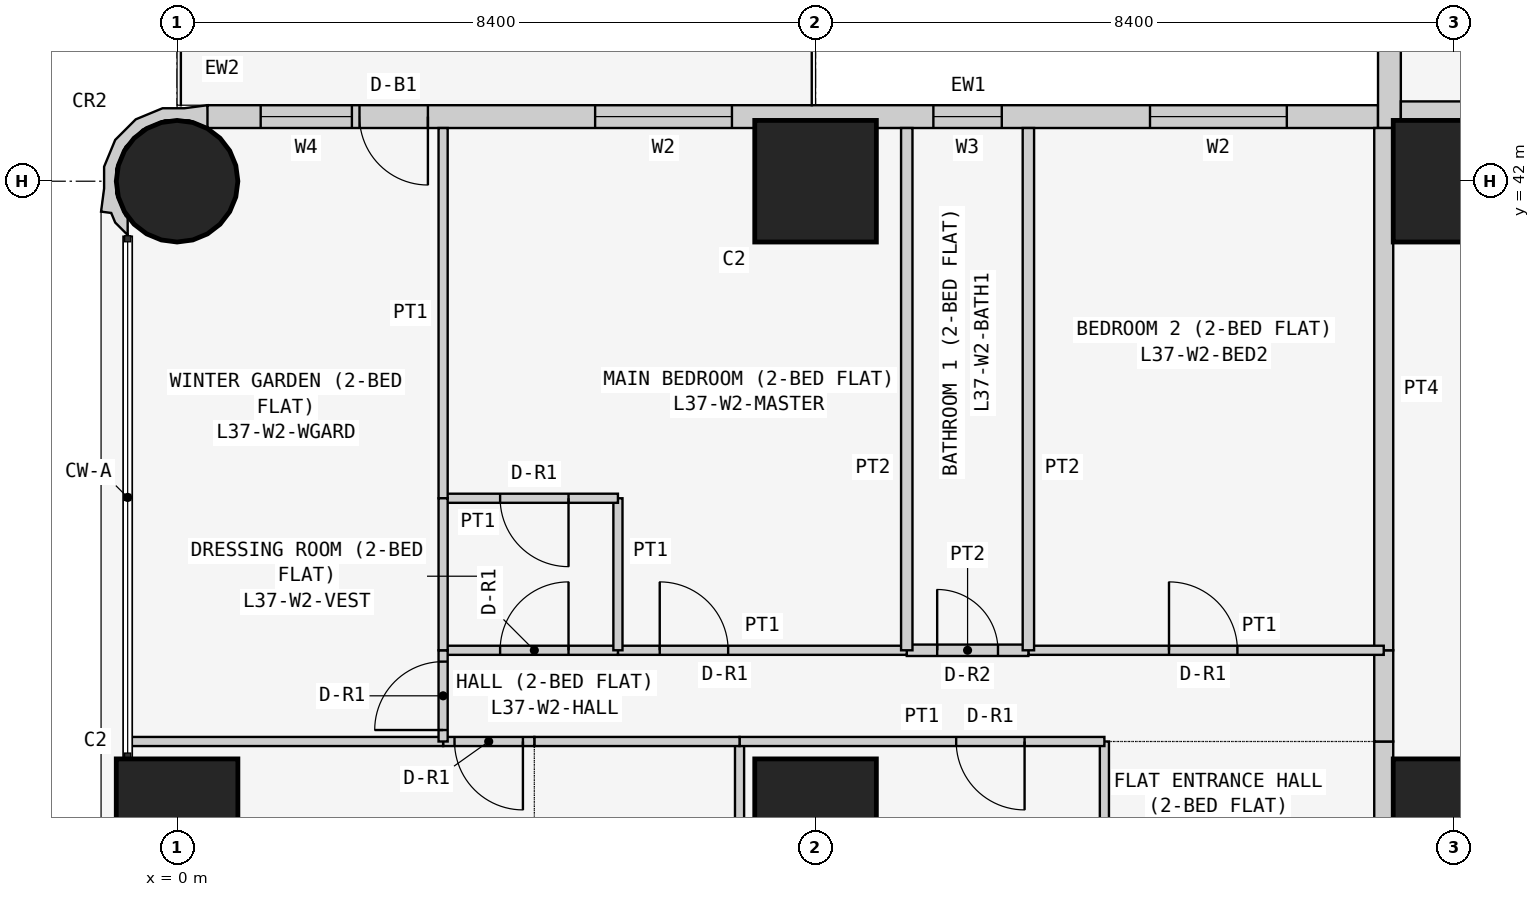
"""IFC4 building model, lengths in metres.
Left out: names, types, materials, properties, quantities, classifications, styles, units other than length and angle.
Written with IfcOpenShell. Run it as: python <this file> out.ifc"""

import sys

from ifc_helpers import new_model, si_unit, direction, frame, frame_2d, origin, origin_2d, place, context, subcontext, project, spatial, polyline, rectangle, circle, outline, extrude, element, fill, save


model = new_model("IFC4")
c1 = context("Model", 3, precision=1e-05, world=origin(), true_north=direction((0.0, 1.0)))
c2 = subcontext(c1, "Body", "Model", "MODEL_VIEW")
j1 = project(units=[si_unit("LENGTHUNIT", "METRE"), si_unit("PLANEANGLEUNIT", "RADIAN")], contexts=[c1])
p1 = place(None, origin())
s1 = spatial("IfcSite", under=j1, at=p1, CompositionType="ELEMENT")
p2 = place(p1, origin())
s2 = spatial("IfcBuilding", under=s1, at=p2, CompositionType="ELEMENT")
p3 = place(p2, frame((0.0, 0.0, 144.9)))
s3 = spatial("IfcBuildingStorey", under=s2, at=p3, CompositionType="ELEMENT", Elevation=144.9)
p4 = place(p3, frame((0.0, 33.6, 0.0), z_axis=(0.0, 0.0, 1.0), x_axis=(1.0, 0.0, 0.0)))
e1 = element("IfcColumn", 1, at=p4, inside=s3, PredefinedType="COLUMN", context=c2, shape_type="SweptSolid", body=[
    extrude(rectangle(XDim=1.6, YDim=1.6, at=origin_2d()), origin(), (0.0, 0.0, 1.0), 3.6),
])
p5 = place(p3, frame((0.0, 42.0, 0.0), z_axis=(0.0, 0.0, 1.0), x_axis=(1.0, 0.0, 0.0)))
e2 = element("IfcColumn", 2, at=p5, inside=s3, PredefinedType="COLUMN", context=c2, shape_type="SweptSolid", body=[
    extrude(circle(Radius=0.8, at=origin_2d()), origin(), (0.0, 0.0, 1.0), 3.6),
])
for number, where, z_axis, x_axis in (
    (3, (8.4, 33.6, 0.0), (0.0, 0.0, 1.0), (1.0, 0.0, 0.0)),
    (4, (8.4, 42.0, 0.0), (0.0, 0.0, 1.0), (1.0, 0.0, 0.0)),
    (5, (16.8, 33.6, 0.0), (0.0, 0.0, 1.0), (1.0, 0.0, 0.0)),
    (6, (16.8, 42.0, 0.0), (0.0, 0.0, 1.0), (1.0, 0.0, 0.0)),
):
    element("IfcColumn", number, at=place(p3, frame(where, z_axis=z_axis, x_axis=x_axis)), inside=s3, PredefinedType="COLUMN", context=c2, shape_type="SweptSolid", body=[
        extrude(rectangle(XDim=1.6, YDim=1.6, at=origin_2d()), origin(), (0.0, 0.0, 1.0), 3.6),
    ])
p6 = place(p3, frame((15.8, 42.85, 0.0), z_axis=(0.0, 0.0, 1.0), x_axis=(-1.0, 0.0, 0.0)))
e7 = element("IfcWall", 7, at=p6, inside=s3, PredefinedType="SOLIDWALL", context=c2, shape_type="SweptSolid", body=[
    extrude(rectangle(XDim=15.4, YDim=0.3, at=frame_2d((7.7, 0.0))), origin(), (0.0, 0.0, 1.0), 3.45),
])
p7 = place(p6, frame((1.2, 0.0, 0.9)))
e8 = element("IfcOpeningElement", 8, at=p7, cuts=e7, PredefinedType="OPENING", context=c2, shape_type="SweptSolid", body=[
    extrude(rectangle(XDim=1.8, YDim=1.5, at=frame_2d((0.9, 0.75))), frame((0.0, 0.16, 0.0), z_axis=(0.0, -1.0, 0.0), x_axis=(1.0, 0.0, 0.0)), (0.0, 0.0, 1.0), 0.32),
])
p8 = place(p6, frame((4.95, 0.0, 1.5)))
e9 = element("IfcOpeningElement", 9, at=p8, cuts=e7, PredefinedType="OPENING", context=c2, shape_type="SweptSolid", body=[
    extrude(rectangle(XDim=0.9, YDim=0.7, at=frame_2d((0.45, 0.35))), frame((0.0, 0.16, 0.0), z_axis=(0.0, -1.0, 0.0), x_axis=(1.0, 0.0, 0.0)), (0.0, 0.0, 1.0), 0.32),
])
p9 = place(p6, frame((8.5, 0.0, 0.9)))
e10 = element("IfcOpeningElement", 10, at=p9, cuts=e7, PredefinedType="OPENING", context=c2, shape_type="SweptSolid", body=[
    extrude(rectangle(XDim=1.8, YDim=1.5, at=frame_2d((0.9, 0.75))), frame((0.0, 0.16, 0.0), z_axis=(0.0, -1.0, 0.0), x_axis=(1.0, 0.0, 0.0)), (0.0, 0.0, 1.0), 0.32),
])
p10 = place(p6, frame((12.5, 0.0, 0.0)))
e11 = element("IfcOpeningElement", 11, at=p10, cuts=e7, PredefinedType="OPENING", context=c2, shape_type="SweptSolid", body=[
    extrude(rectangle(XDim=0.9, YDim=2.4, at=frame_2d((0.45, 1.2))), frame((0.0, 0.16, 0.0), z_axis=(0.0, -1.0, 0.0), x_axis=(1.0, 0.0, 0.0)), (0.0, 0.0, 1.0), 0.32),
])
p11 = place(p6, frame((13.5, 0.0, 0.9)))
e12 = element("IfcOpeningElement", 12, at=p11, cuts=e7, PredefinedType="OPENING", context=c2, shape_type="SweptSolid", body=[
    extrude(rectangle(XDim=1.2, YDim=1.5, at=frame_2d((0.6, 0.75))), frame((0.0, 0.16, 0.0), z_axis=(0.0, -1.0, 0.0), x_axis=(1.0, 0.0, 0.0)), (0.0, 0.0, 1.0), 0.32),
])
p12 = place(p3, frame((15.95, 50.0, 0.0), z_axis=(0.0, 0.0, 1.0), x_axis=(0.0, -1.0, 0.0)))
e13 = element("IfcWall", 13, at=p12, inside=s3, PredefinedType="SOLIDWALL", context=c2, shape_type="SweptSolid", body=[
    extrude(rectangle(XDim=7.3, YDim=0.3, at=frame_2d((3.65, 0.0))), origin(), (0.0, 0.0, 1.0), 3.45),
])
p13 = place(p12, frame((3.1, 0.0, 0.9)))
e14 = element("IfcOpeningElement", 14, at=p13, cuts=e13, PredefinedType="OPENING", context=c2, shape_type="SweptSolid", body=[
    extrude(rectangle(XDim=2.4, YDim=1.5, at=frame_2d((1.2, 0.75))), frame((0.0, 0.16, 0.0), z_axis=(0.0, -1.0, 0.0), x_axis=(1.0, 0.0, 0.0)), (0.0, 0.0, 1.0), 0.32),
])
p14 = place(p12, frame((0.75, 0.0, 0.9)))
e15 = element("IfcOpeningElement", 15, at=p14, cuts=e13, PredefinedType="OPENING", context=c2, shape_type="SweptSolid", body=[
    extrude(rectangle(XDim=1.2, YDim=1.5, at=frame_2d((0.6, 0.75))), frame((0.0, 0.16, 0.0), z_axis=(0.0, -1.0, 0.0), x_axis=(1.0, 0.0, 0.0)), (0.0, 0.0, 1.0), 0.32),
])
p15 = place(p3, frame((0.327, 42.817, 0.0), z_axis=(0.0, 0.0, 1.0), x_axis=(-0.93923434088, 0.343276641956, 0.0)))
e16 = element("IfcWall", 16, at=p15, inside=s3, PredefinedType="SOLIDWALL", context=c2, shape_type="SweptSolid", body=[
    extrude(outline(polyline([(-0.006, -0.197), (0.266, -0.055), (0.535, 0.044), (0.816, 0.302), (0.977, 0.648), (0.994, 1.03), (0.895, 1.299), (0.828, 1.598), (0.697, 1.569), (0.604, 1.67), (0.394, 1.767), (0.471, 1.556), (0.509, 1.539), (0.724, 1.304), (0.833, 1.005), (0.82, 0.687), (0.686, 0.397), (0.451, 0.182), (0.152, 0.073), (-0.116, 0.084), (-0.127, 0.078), (-0.146, 0.071), (-0.006, -0.197)])), origin(), (0.0, 0.0, 1.0), 3.45),
])
p16 = place(p3, frame((16.1, 42.925, 0.0), z_axis=(0.0, 0.0, 1.0), x_axis=(1.0, 0.0, 0.0)))
e17 = element("IfcWall", 17, at=p16, inside=s3, PredefinedType="PARTITIONING", context=c2, shape_type="SweptSolid", body=[
    extrude(rectangle(XDim=6.871, YDim=0.25, at=frame_2d((3.436, 0.0))), origin(), (0.0, 0.0, 1.0), 3.45),
])
p17 = place(p3, frame((15.875, 29.4, 0.0), z_axis=(0.0, 0.0, 1.0), x_axis=(0.0, 1.0, 0.0)))
e18 = element("IfcWall", 18, at=p17, inside=s3, PredefinedType="PARTITIONING", context=c2, shape_type="SweptSolid", body=[
    extrude(rectangle(XDim=5.229, YDim=0.25, at=frame_2d((2.615, 0.0))), origin(), (0.0, 0.0, 1.0), 3.45),
])
p18 = place(p17, frame((2.1, 0.0, 0.0)))
e19 = element("IfcOpeningElement", 19, at=p18, cuts=e18, PredefinedType="OPENING", context=c2, shape_type="SweptSolid", body=[
    extrude(rectangle(XDim=1.0, YDim=2.1, at=frame_2d((0.5, 1.05))), frame((0.0, 0.135, 0.0), z_axis=(0.0, -1.0, 0.0), x_axis=(1.0, 0.0, 0.0)), (0.0, 0.0, 1.0), 0.27),
])
p19 = place(p3, frame((15.875, 34.629, 0.0), z_axis=(0.0, 0.0, 1.0), x_axis=(0.0, 1.0, 0.0)))
e20 = element("IfcWall", 20, at=p19, inside=s3, PredefinedType="PARTITIONING", context=c2, shape_type="SweptSolid", body=[
    extrude(rectangle(XDim=1.2, YDim=0.25, at=frame_2d((0.6, 0.0))), origin(), (0.0, 0.0, 1.0), 3.45),
])
p20 = place(p3, frame((15.875, 35.829, 0.0), z_axis=(0.0, 0.0, 1.0), x_axis=(0.0, 1.0, 0.0)))
e21 = element("IfcWall", 21, at=p20, inside=s3, PredefinedType="PARTITIONING", context=c2, shape_type="SweptSolid", body=[
    extrude(rectangle(XDim=6.871, YDim=0.25, at=frame_2d((3.436, 0.0))), origin(), (0.0, 0.0, 1.0), 3.45),
])
for number, where, z_axis, x_axis in (
    (22, (12.2, 29.4, 0.0), (0.0, 0.0, 1.0), (0.0, 1.0, 0.0)),
    (23, (7.4, 29.4, 0.0), (0.0, 0.0, 1.0), (0.0, 1.0, 0.0)),
):
    element("IfcWall", number, at=place(p3, frame(where, z_axis=z_axis, x_axis=x_axis)), inside=s3, PredefinedType="PARTITIONING", context=c2, shape_type="SweptSolid", body=[
        extrude(rectangle(XDim=5.229, YDim=0.12, at=frame_2d((2.615, 0.0))), origin(), (0.0, 0.0, 1.0), 3.45),
    ])
p21 = place(p3, frame((7.4, 34.629, 0.0), z_axis=(0.0, 0.0, 1.0), x_axis=(1.0, 0.0, 0.0)))
e24 = element("IfcWall", 24, at=p21, inside=s3, PredefinedType="PARTITIONING", context=c2, shape_type="SweptSolid", body=[
    extrude(rectangle(XDim=4.8, YDim=0.12, at=frame_2d((2.4, 0.0))), origin(), (0.0, 0.0, 1.0), 3.45),
])
p22 = place(p21, frame((2.85, 0.0, 0.0)))
e25 = element("IfcOpeningElement", 25, at=p22, cuts=e24, PredefinedType="OPENING", context=c2, shape_type="SweptSolid", body=[
    extrude(rectangle(XDim=0.9, YDim=2.1, at=frame_2d((0.45, 1.05))), frame((0.0, 0.07, 0.0), z_axis=(0.0, -1.0, 0.0), x_axis=(1.0, 0.0, 0.0)), (0.0, 0.0, 1.0), 0.14),
])
p23 = place(p3, frame((4.7, 34.629, 0.0), z_axis=(0.0, 0.0, 1.0), x_axis=(1.0, 0.0, 0.0)))
e26 = element("IfcWall", 26, at=p23, inside=s3, PredefinedType="PARTITIONING", context=c2, shape_type="SweptSolid", body=[
    extrude(rectangle(XDim=2.7, YDim=0.12, at=frame_2d((1.35, 0.0))), origin(), (0.0, 0.0, 1.0), 3.45),
])
p24 = place(p3, frame((3.5, 34.629, 0.0), z_axis=(0.0, 0.0, 1.0), x_axis=(1.0, 0.0, 0.0)))
e27 = element("IfcWall", 27, at=p24, inside=s3, PredefinedType="PARTITIONING", context=c2, shape_type="SweptSolid", body=[
    extrude(rectangle(XDim=1.2, YDim=0.12, at=frame_2d((0.6, 0.0))), origin(), (0.0, 0.0, 1.0), 3.45),
])
p25 = place(p24, frame((0.15, 0.0, 0.0)))
e28 = element("IfcOpeningElement", 28, at=p25, cuts=e27, PredefinedType="OPENING", context=c2, shape_type="SweptSolid", body=[
    extrude(rectangle(XDim=0.9, YDim=2.1, at=frame_2d((0.45, 1.05))), frame((0.0, 0.07, 0.0), z_axis=(0.0, -1.0, 0.0), x_axis=(1.0, 0.0, 0.0)), (0.0, 0.0, 1.0), 0.14),
])
p26 = place(p3, frame((-0.65, 34.629, 0.0), z_axis=(0.0, 0.0, 1.0), x_axis=(1.0, 0.0, 0.0)))
e29 = element("IfcWall", 29, at=p26, inside=s3, PredefinedType="PARTITIONING", context=c2, shape_type="SweptSolid", body=[
    extrude(rectangle(XDim=4.15, YDim=0.12, at=frame_2d((2.075, 0.0))), origin(), (0.0, 0.0, 1.0), 3.45),
])
p27 = place(p3, frame((11.2, 35.829, 0.0), z_axis=(0.0, 0.0, 1.0), x_axis=(1.0, 0.0, 0.0)))
e30 = element("IfcWall", 30, at=p27, inside=s3, PredefinedType="PARTITIONING", context=c2, shape_type="SweptSolid", body=[
    extrude(rectangle(XDim=4.675, YDim=0.12, at=frame_2d((2.337, 0.0))), origin(), (0.0, 0.0, 1.0), 3.45),
])
p28 = place(p27, frame((1.85, 0.0, 0.0)))
e31 = element("IfcOpeningElement", 31, at=p28, cuts=e30, PredefinedType="OPENING", context=c2, shape_type="SweptSolid", body=[
    extrude(rectangle(XDim=0.9, YDim=2.1, at=frame_2d((0.45, 1.05))), frame((0.0, 0.07, 0.0), z_axis=(0.0, -1.0, 0.0), x_axis=(1.0, 0.0, 0.0)), (0.0, 0.0, 1.0), 0.14),
])
p29 = place(p3, frame((9.6, 35.829, 0.0), z_axis=(0.0, 0.0, 1.0), x_axis=(1.0, 0.0, 0.0)))
e32 = element("IfcWall", 32, at=p29, inside=s3, PredefinedType="PARTITIONING", context=c2, shape_type="SweptSolid", body=[
    extrude(rectangle(XDim=1.6, YDim=0.15, at=frame_2d((0.8, 0.0))), origin(), (0.0, 0.0, 1.0), 3.45),
])
p30 = place(p29, frame((0.4, 0.0, 0.0)))
e33 = element("IfcOpeningElement", 33, at=p30, cuts=e32, PredefinedType="OPENING", context=c2, shape_type="SweptSolid", body=[
    extrude(rectangle(XDim=0.8, YDim=2.1, at=frame_2d((0.4, 1.05))), frame((0.0, 0.085, 0.0), z_axis=(0.0, -1.0, 0.0), x_axis=(1.0, 0.0, 0.0)), (0.0, 0.0, 1.0), 0.17),
])
p31 = place(p3, frame((5.8, 35.829, 0.0), z_axis=(0.0, 0.0, 1.0), x_axis=(1.0, 0.0, 0.0)))
e34 = element("IfcWall", 34, at=p31, inside=s3, PredefinedType="PARTITIONING", context=c2, shape_type="SweptSolid", body=[
    extrude(rectangle(XDim=3.8, YDim=0.12, at=frame_2d((1.9, 0.0))), origin(), (0.0, 0.0, 1.0), 3.45),
])
p32 = place(p31, frame((0.55, 0.0, 0.0)))
e35 = element("IfcOpeningElement", 35, at=p32, cuts=e34, PredefinedType="OPENING", context=c2, shape_type="SweptSolid", body=[
    extrude(rectangle(XDim=0.9, YDim=2.1, at=frame_2d((0.45, 1.05))), frame((0.0, 0.07, 0.0), z_axis=(0.0, -1.0, 0.0), x_axis=(1.0, 0.0, 0.0)), (0.0, 0.0, 1.0), 0.14),
])
p33 = place(p3, frame((3.5, 35.829, 0.0), z_axis=(0.0, 0.0, 1.0), x_axis=(1.0, 0.0, 0.0)))
e36 = element("IfcWall", 36, at=p33, inside=s3, PredefinedType="PARTITIONING", context=c2, shape_type="SweptSolid", body=[
    extrude(rectangle(XDim=2.3, YDim=0.12, at=frame_2d((1.15, 0.0))), origin(), (0.0, 0.0, 1.0), 3.45),
])
p34 = place(p33, frame((0.75, 0.0, 0.0)))
e37 = element("IfcOpeningElement", 37, at=p34, cuts=e36, PredefinedType="OPENING", context=c2, shape_type="SweptSolid", body=[
    extrude(rectangle(XDim=0.9, YDim=2.1, at=frame_2d((0.45, 1.05))), frame((0.0, 0.07, 0.0), z_axis=(0.0, -1.0, 0.0), x_axis=(1.0, 0.0, 0.0)), (0.0, 0.0, 1.0), 0.14),
])
p35 = place(p3, frame((3.5, 34.629, 0.0), z_axis=(0.0, 0.0, 1.0), x_axis=(0.0, 1.0, 0.0)))
e38 = element("IfcWall", 38, at=p35, inside=s3, PredefinedType="PARTITIONING", context=c2, shape_type="SweptSolid", body=[
    extrude(rectangle(XDim=1.2, YDim=0.12, at=frame_2d((0.6, 0.0))), origin(), (0.0, 0.0, 1.0), 3.45),
])
p36 = place(p35, frame((0.151, 0.0, 0.0)))
e39 = element("IfcOpeningElement", 39, at=p36, cuts=e38, PredefinedType="OPENING", context=c2, shape_type="SweptSolid", body=[
    extrude(rectangle(XDim=0.9, YDim=2.1, at=frame_2d((0.45, 1.05))), frame((0.0, 0.07, 0.0), z_axis=(0.0, -1.0, 0.0), x_axis=(1.0, 0.0, 0.0)), (0.0, 0.0, 1.0), 0.14),
])
for number, where, z_axis, x_axis in (
    (40, (11.2, 35.829, 0.0), (0.0, 0.0, 1.0), (0.0, 1.0, 0.0)),
    (41, (9.6, 35.829, 0.0), (0.0, 0.0, 1.0), (0.0, 1.0, 0.0)),
):
    element("IfcWall", number, at=place(p3, frame(where, z_axis=z_axis, x_axis=x_axis)), inside=s3, PredefinedType="PARTITIONING", context=c2, shape_type="SweptSolid", body=[
        extrude(rectangle(XDim=6.871, YDim=0.15, at=frame_2d((3.436, 0.0))), origin(), (0.0, 0.0, 1.0), 3.45),
    ])
p37 = place(p3, frame((5.8, 35.829, 0.0), z_axis=(0.0, 0.0, 1.0), x_axis=(0.0, 1.0, 0.0)))
e42 = element("IfcWall", 42, at=p37, inside=s3, PredefinedType="PARTITIONING", context=c2, shape_type="SweptSolid", body=[
    extrude(rectangle(XDim=2.0, YDim=0.12, at=frame_2d((1.0, 0.0))), origin(), (0.0, 0.0, 1.0), 3.45),
])
p38 = place(p3, frame((5.8, 37.829, 0.0), z_axis=(0.0, 0.0, 1.0), x_axis=(-1.0, 0.0, 0.0)))
e43 = element("IfcWall", 43, at=p38, inside=s3, PredefinedType="PARTITIONING", context=c2, shape_type="SweptSolid", body=[
    extrude(rectangle(XDim=2.3, YDim=0.12, at=frame_2d((1.15, 0.0))), origin(), (0.0, 0.0, 1.0), 3.45),
])
p39 = place(p38, frame((0.65, 0.0, 0.0)))
e44 = element("IfcOpeningElement", 44, at=p39, cuts=e43, PredefinedType="OPENING", context=c2, shape_type="SweptSolid", body=[
    extrude(rectangle(XDim=0.9, YDim=2.1, at=frame_2d((0.45, 1.05))), frame((0.0, 0.07, 0.0), z_axis=(0.0, -1.0, 0.0), x_axis=(1.0, 0.0, 0.0)), (0.0, 0.0, 1.0), 0.14),
])
p40 = place(p3, frame((3.5, 37.829, 0.0), z_axis=(0.0, 0.0, 1.0), x_axis=(0.0, 1.0, 0.0)))
e45 = element("IfcWall", 45, at=p40, inside=s3, PredefinedType="PARTITIONING", context=c2, shape_type="SweptSolid", body=[
    extrude(rectangle(XDim=4.871, YDim=0.12, at=frame_2d((2.436, 0.0))), origin(), (0.0, 0.0, 1.0), 3.45),
])
p41 = place(p3, frame((3.5, 35.829, 0.0), z_axis=(0.0, 0.0, 1.0), x_axis=(0.0, 1.0, 0.0)))
e46 = element("IfcWall", 46, at=p41, inside=s3, PredefinedType="PARTITIONING", context=c2, shape_type="SweptSolid", body=[
    extrude(rectangle(XDim=2.0, YDim=0.12, at=frame_2d((1.0, 0.0))), origin(), (0.0, 0.0, 1.0), 3.45),
])
p42 = place(p7, origin())
e47 = element("IfcWindow", 47, at=p42, inside=s3, PartitioningType="SINGLE_PANEL", PredefinedType="WINDOW", context=c2, shape_type="SweptSolid", body=[
    extrude(rectangle(XDim=1.8, YDim=1.5, at=frame_2d((0.9, 0.75))), frame((0.0, 0.03, 0.0), z_axis=(0.0, -1.0, 0.0), x_axis=(1.0, 0.0, 0.0)), (0.0, 0.0, 1.0), 0.06),
])
fill(e8, e47)
p43 = place(p8, origin())
e48 = element("IfcWindow", 48, at=p43, inside=s3, PartitioningType="SINGLE_PANEL", PredefinedType="WINDOW", context=c2, shape_type="SweptSolid", body=[
    extrude(rectangle(XDim=0.9, YDim=0.7, at=frame_2d((0.45, 0.35))), frame((0.0, 0.03, 0.0), z_axis=(0.0, -1.0, 0.0), x_axis=(1.0, 0.0, 0.0)), (0.0, 0.0, 1.0), 0.06),
])
fill(e9, e48)
p44 = place(p9, origin())
e49 = element("IfcWindow", 49, at=p44, inside=s3, PartitioningType="SINGLE_PANEL", PredefinedType="WINDOW", context=c2, shape_type="SweptSolid", body=[
    extrude(rectangle(XDim=1.8, YDim=1.5, at=frame_2d((0.9, 0.75))), frame((0.0, 0.03, 0.0), z_axis=(0.0, -1.0, 0.0), x_axis=(1.0, 0.0, 0.0)), (0.0, 0.0, 1.0), 0.06),
])
fill(e10, e49)
p45 = place(p10, origin())
e50 = element("IfcDoor", 50, at=p45, inside=s3, OperationType="SINGLE_SWING_LEFT", PredefinedType="DOOR", context=c2, shape_type="SweptSolid", body=[
    extrude(rectangle(XDim=0.9, YDim=2.4, at=frame_2d((0.45, 1.2))), frame((0.0, 0.025, 0.0), z_axis=(0.0, -1.0, 0.0), x_axis=(1.0, 0.0, 0.0)), (0.0, 0.0, 1.0), 0.05),
])
fill(e11, e50)
p46 = place(p11, origin())
e51 = element("IfcWindow", 51, at=p46, inside=s3, PartitioningType="SINGLE_PANEL", PredefinedType="WINDOW", context=c2, shape_type="SweptSolid", body=[
    extrude(rectangle(XDim=1.2, YDim=1.5, at=frame_2d((0.6, 0.75))), frame((0.0, 0.03, 0.0), z_axis=(0.0, -1.0, 0.0), x_axis=(1.0, 0.0, 0.0)), (0.0, 0.0, 1.0), 0.06),
])
fill(e12, e51)
p47 = place(p22, frame((0.9, 0.0, 0.0), z_axis=(0.0, 0.0, 1.0), x_axis=(-1.0, 0.0, 0.0)))
e52 = element("IfcDoor", 52, at=p47, inside=s3, OperationType="SINGLE_SWING_LEFT", PredefinedType="DOOR", context=c2, shape_type="SweptSolid", body=[
    extrude(rectangle(XDim=0.9, YDim=2.1, at=frame_2d((0.45, 1.05))), frame((0.0, 0.025, 0.0), z_axis=(0.0, -1.0, 0.0), x_axis=(1.0, 0.0, 0.0)), (0.0, 0.0, 1.0), 0.05),
])
fill(e25, e52)
p48 = place(p25, frame((0.9, 0.0, 0.0), z_axis=(0.0, 0.0, 1.0), x_axis=(-1.0, 0.0, 0.0)))
e53 = element("IfcDoor", 53, at=p48, inside=s3, OperationType="SINGLE_SWING_LEFT", PredefinedType="DOOR", context=c2, shape_type="SweptSolid", body=[
    extrude(rectangle(XDim=0.9, YDim=2.1, at=frame_2d((0.45, 1.05))), frame((0.0, 0.025, 0.0), z_axis=(0.0, -1.0, 0.0), x_axis=(1.0, 0.0, 0.0)), (0.0, 0.0, 1.0), 0.05),
])
fill(e28, e53)
p49 = place(p28, origin())
e54 = element("IfcDoor", 54, at=p49, inside=s3, OperationType="SINGLE_SWING_LEFT", PredefinedType="DOOR", context=c2, shape_type="SweptSolid", body=[
    extrude(rectangle(XDim=0.9, YDim=2.1, at=frame_2d((0.45, 1.05))), frame((0.0, 0.025, 0.0), z_axis=(0.0, -1.0, 0.0), x_axis=(1.0, 0.0, 0.0)), (0.0, 0.0, 1.0), 0.05),
])
fill(e31, e54)
p50 = place(p30, origin())
e55 = element("IfcDoor", 55, at=p50, inside=s3, OperationType="SINGLE_SWING_LEFT", PredefinedType="DOOR", context=c2, shape_type="SweptSolid", body=[
    extrude(rectangle(XDim=0.8, YDim=2.1, at=frame_2d((0.4, 1.05))), frame((0.0, 0.025, 0.0), z_axis=(0.0, -1.0, 0.0), x_axis=(1.0, 0.0, 0.0)), (0.0, 0.0, 1.0), 0.05),
])
fill(e33, e55)
p51 = place(p32, origin())
e56 = element("IfcDoor", 56, at=p51, inside=s3, OperationType="SINGLE_SWING_LEFT", PredefinedType="DOOR", context=c2, shape_type="SweptSolid", body=[
    extrude(rectangle(XDim=0.9, YDim=2.1, at=frame_2d((0.45, 1.05))), frame((0.0, 0.025, 0.0), z_axis=(0.0, -1.0, 0.0), x_axis=(1.0, 0.0, 0.0)), (0.0, 0.0, 1.0), 0.05),
])
fill(e35, e56)
p52 = place(p34, origin())
e57 = element("IfcDoor", 57, at=p52, inside=s3, OperationType="SINGLE_SWING_RIGHT", PredefinedType="DOOR", context=c2, shape_type="SweptSolid", body=[
    extrude(rectangle(XDim=0.9, YDim=2.1, at=frame_2d((0.45, 1.05))), frame((0.0, 0.025, 0.0), z_axis=(0.0, -1.0, 0.0), x_axis=(1.0, 0.0, 0.0)), (0.0, 0.0, 1.0), 0.05),
])
fill(e37, e57)
p53 = place(p39, origin())
e58 = element("IfcDoor", 58, at=p53, inside=s3, OperationType="SINGLE_SWING_LEFT", PredefinedType="DOOR", context=c2, shape_type="SweptSolid", body=[
    extrude(rectangle(XDim=0.9, YDim=2.1, at=frame_2d((0.45, 1.05))), frame((0.0, 0.025, 0.0), z_axis=(0.0, -1.0, 0.0), x_axis=(1.0, 0.0, 0.0)), (0.0, 0.0, 1.0), 0.05),
])
fill(e44, e58)
p54 = place(p36, origin())
e59 = element("IfcDoor", 59, at=p54, inside=s3, OperationType="SINGLE_SWING_LEFT", PredefinedType="DOOR", context=c2, shape_type="SweptSolid", body=[
    extrude(rectangle(XDim=0.9, YDim=2.1, at=frame_2d((0.45, 1.05))), frame((0.0, 0.025, 0.0), z_axis=(0.0, -1.0, 0.0), x_axis=(1.0, 0.0, 0.0)), (0.0, 0.0, 1.0), 0.05),
])
fill(e39, e59)
save(model, sys.argv[1])
